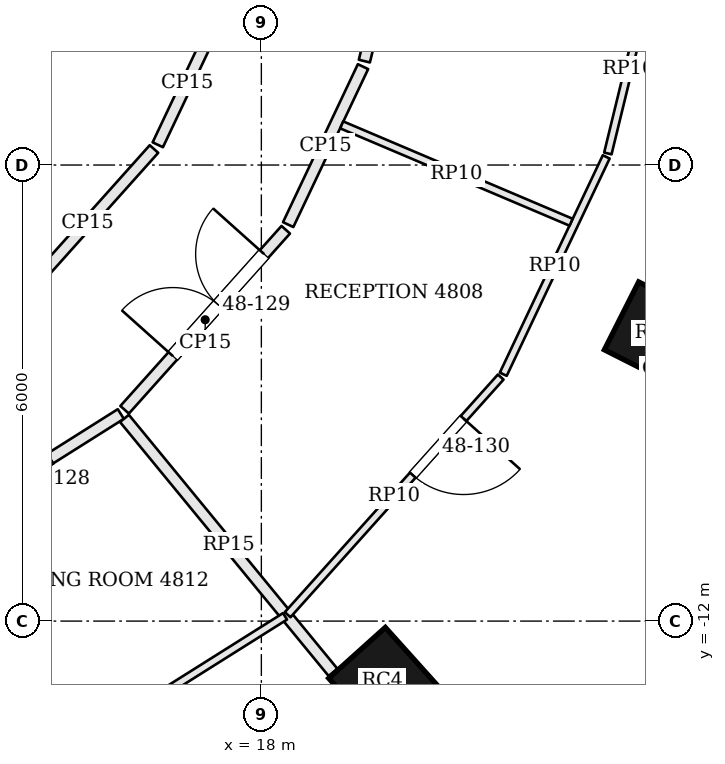
"""IFC4 building model, lengths in metres.
Left out: names, types, materials, properties, quantities, classifications, styles, units other than length and angle.
Written with IfcOpenShell. Run it as: python <this file> out.ifc"""

import sys

from ifc_helpers import new_model, si_unit, direction, frame, frame_2d, origin, origin_2d, place, context, subcontext, project, spatial, rectangle, extrude, element, fill, save


model = new_model("IFC4")
c1 = context("Model", 3, precision=1e-05, world=origin(), true_north=direction((0.0, 1.0)))
c2 = subcontext(c1, "Body", "Model", "MODEL_VIEW")
j1 = project(units=[si_unit("LENGTHUNIT", "METRE"), si_unit("PLANEANGLEUNIT", "RADIAN")], contexts=[c1])
p1 = place(None, origin())
s1 = spatial("IfcSite", under=j1, at=p1, CompositionType="ELEMENT")
p2 = place(p1, origin())
s2 = spatial("IfcBuilding", under=s1, at=p2, CompositionType="ELEMENT")
p3 = place(p2, frame((0.0, 0.0, 197.4)))
s3 = spatial("IfcBuildingStorey", under=s2, at=p3, CompositionType="ELEMENT", Elevation=197.4)
for number, where, z_axis, x_axis in (
    (1, (19.593, -12.79, 0.0), (0.0, 0.0, 1.0), (0.744, 0.668, 0.0)),
    (2, (23.185, -8.21, 0.0), (0.0, 0.0, 1.0), (0.451, 0.893, 0.0)),
):
    element("IfcColumn", number, at=place(p3, frame(where, z_axis=z_axis, x_axis=x_axis)), inside=s3, PredefinedType="COLUMN", context=c2, shape_type="SweptSolid", body=[
        extrude(rectangle(XDim=1.0, YDim=1.0, at=origin_2d()), origin(), (0.0, 0.0, 1.0), 3.9),
    ])
p4 = place(p3, frame((20.316, -14.507, 0.0), z_axis=(0.0, 0.0, 1.0), x_axis=(0.954807195185, 0.297225873743, 0.0)))
e3 = element("IfcWall", 3, at=p4, inside=s3, PredefinedType="SOLIDWALL", context=c2, shape_type="SweptSolid", body=[
    extrude(rectangle(XDim=5.526, YDim=0.45, at=frame_2d((2.763, 0.0))), origin(), (0.0, 0.0, 1.0), 3.7),
])
p5 = place(p4, frame((1.713, 0.0, 0.9)))
e4 = element("IfcOpeningElement", 4, at=p5, cuts=e3, PredefinedType="OPENING", context=c2, shape_type="SweptSolid", body=[
    extrude(rectangle(XDim=2.1, YDim=2.3, at=frame_2d((1.05, 1.15))), frame((0.0, 0.235, 0.0), z_axis=(0.0, -1.0, 0.0), x_axis=(1.0, 0.0, 0.0)), (0.0, 0.0, 1.0), 0.47),
])
p6 = place(p3, frame((13.197, -11.139, 0.0), z_axis=(0.0, 0.0, 1.0), x_axis=(0.845847451173, 0.533424867572, 0.0)))
e5 = element("IfcWall", 5, at=p6, inside=s3, PredefinedType="PARTITIONING", context=c2, shape_type="SweptSolid", body=[
    extrude(rectangle(XDim=3.493, YDim=0.15, at=frame_2d((1.747, 0.0))), origin(), (0.0, 0.0, 1.0), 3.084),
])
p7 = place(p6, frame((1.394, 0.0, 0.0)))
e6 = element("IfcOpeningElement", 6, at=p7, cuts=e5, PredefinedType="OPENING", context=c2, shape_type="SweptSolid", body=[
    extrude(rectangle(XDim=1.0, YDim=2.4, at=frame_2d((0.5, 1.2))), frame((0.0, 0.085, 0.0), z_axis=(0.0, -1.0, 0.0), x_axis=(1.0, 0.0, 0.0)), (0.0, 0.0, 1.0), 0.17),
])
p8 = place(p3, frame((18.943, -12.675, 0.0), z_axis=(0.0, 0.0, 1.0), x_axis=(-0.634730994321, 0.772733178301, 0.0)))
e7 = element("IfcWall", 7, at=p8, inside=s3, PredefinedType="PARTITIONING", context=c2, shape_type="SweptSolid", body=[
    extrude(rectangle(XDim=4.324, YDim=0.15, at=frame_2d((2.162, 0.0))), origin(), (0.0, 0.0, 1.0), 3.084),
])
p9 = place(p3, frame((16.201, -9.22, 0.0), z_axis=(0.0, 0.0, 1.0), x_axis=(0.666925083627, 0.745124776685, 0.0)))
e8 = element("IfcWall", 8, at=p9, inside=s3, PredefinedType="PARTITIONING", context=c2, shape_type="SweptSolid", body=[
    extrude(rectangle(XDim=3.178, YDim=0.15, at=frame_2d((1.589, 0.0))), origin(), (0.0, 0.0, 1.0), 3.084),
])
p10 = place(p9, frame((0.95, 0.0, 0.0)))
e9 = element("IfcOpeningElement", 9, at=p10, cuts=e8, PredefinedType="OPENING", context=c2, shape_type="SweptSolid", body=[
    extrude(rectangle(XDim=1.8, YDim=2.1, at=frame_2d((0.9, 1.05))), frame((0.0, 0.085, 0.0), z_axis=(0.0, -1.0, 0.0), x_axis=(1.0, 0.0, 0.0)), (0.0, 0.0, 1.0), 0.17),
])
p11 = place(p3, frame((18.353, -6.784, 0.0), z_axis=(0.0, 0.0, 1.0), x_axis=(0.428086344739, 0.903737838894, 0.0)))
e10 = element("IfcWall", 10, at=p11, inside=s3, PredefinedType="PARTITIONING", context=c2, shape_type="SweptSolid", body=[
    extrude(rectangle(XDim=2.3, YDim=0.15, at=frame_2d((1.15, 0.0))), origin(), (0.0, 0.0, 1.0), 3.084),
])
p12 = place(p3, frame((19.355, -4.633, 0.0), z_axis=(0.0, 0.0, 1.0), x_axis=(0.236703930685, 0.971581828359, 0.0)))
e11 = element("IfcWall", 11, at=p12, inside=s3, PredefinedType="PARTITIONING", context=c2, shape_type="SweptSolid", body=[
    extrude(rectangle(XDim=1.626, YDim=0.15, at=frame_2d((0.813, 0.0))), origin(), (0.0, 0.0, 1.0), 3.084),
])
p13 = place(p3, frame((17.41, -4.102, 0.0), z_axis=(0.0, 0.0, 1.0), x_axis=(-0.428074720318, -0.903743345107, 0.0)))
e12 = element("IfcWall", 12, at=p13, inside=s3, PredefinedType="PARTITIONING", context=c2, shape_type="SweptSolid", body=[
    extrude(rectangle(XDim=1.806, YDim=0.15, at=frame_2d((0.903, 0.0))), origin(), (0.0, 0.0, 1.0), 3.084),
])
p14 = place(p3, frame((16.587, -5.789, 0.0), z_axis=(0.0, 0.0, 1.0), x_axis=(-0.666887460656, -0.745158449472, 0.0)))
e13 = element("IfcWall", 13, at=p14, inside=s3, PredefinedType="PARTITIONING", context=c2, shape_type="SweptSolid", body=[
    extrude(rectangle(XDim=2.62, YDim=0.15, at=frame_2d((1.31, 0.0))), origin(), (0.0, 0.0, 1.0), 3.084),
])
p15 = place(p3, frame((18.312, -11.938, 0.0), z_axis=(0.0, 0.0, 1.0), x_axis=(-0.846383069278, -0.532574595752, 0.0)))
e14 = element("IfcWall", 14, at=p15, inside=s3, PredefinedType="PARTITIONING", context=c2, shape_type="SweptSolid", body=[
    extrude(rectangle(XDim=4.341, YDim=0.1, at=frame_2d((2.171, 0.0))), origin(), (0.0, 0.0, 1.0), 3.084),
])
p16 = place(p3, frame((23.101, -3.623, 0.0), z_axis=(0.0, 0.0, 1.0), x_axis=(-0.236811358433, -0.971555649727, 0.0)))
e15 = element("IfcWall", 15, at=p16, inside=s3, PredefinedType="PARTITIONING", context=c2, shape_type="SweptSolid", body=[
    extrude(rectangle(XDim=2.29, YDim=0.1, at=frame_2d((1.145, 0.0))), origin(), (0.0, 0.0, 1.0), 3.084),
])
p17 = place(p3, frame((22.537, -5.893, 0.0), z_axis=(0.0, 0.0, 1.0), x_axis=(-0.428099612517, -0.903731554037, 0.0)))
e16 = element("IfcWall", 16, at=p17, inside=s3, PredefinedType="PARTITIONING", context=c2, shape_type="SweptSolid", body=[
    extrude(rectangle(XDim=3.164, YDim=0.1, at=frame_2d((1.582, 0.0))), origin(), (0.0, 0.0, 1.0), 3.084),
])
p18 = place(p3, frame((21.149, -8.789, 0.0), z_axis=(0.0, 0.0, 1.0), x_axis=(-0.667605024822, -0.744515635049, 0.0)))
e17 = element("IfcWall", 17, at=p18, inside=s3, PredefinedType="PARTITIONING", context=c2, shape_type="SweptSolid", body=[
    extrude(rectangle(XDim=4.2, YDim=0.1, at=frame_2d((2.1, 0.0))), origin(), (0.0, 0.0, 1.0), 3.084),
])
p19 = place(p18, frame((0.733, 0.0, 0.0)))
e18 = element("IfcOpeningElement", 18, at=p19, cuts=e17, PredefinedType="OPENING", context=c2, shape_type="SweptSolid", body=[
    extrude(rectangle(XDim=1.0, YDim=2.1, at=frame_2d((0.5, 1.05))), frame((0.0, 0.06, 0.0), z_axis=(0.0, -1.0, 0.0), x_axis=(1.0, 0.0, 0.0)), (0.0, 0.0, 1.0), 0.12),
])
p20 = place(p3, frame((19.057, -5.472, 0.0), z_axis=(0.0, 0.0, 1.0), x_axis=(0.920545263458, -0.390635914792, 0.0)))
e19 = element("IfcWall", 19, at=p20, inside=s3, PredefinedType="PARTITIONING", context=c2, shape_type="SweptSolid", body=[
    extrude(rectangle(XDim=3.278, YDim=0.1, at=frame_2d((1.639, 0.0))), origin(), (0.0, 0.0, 1.0), 3.084),
])
p21 = place(p10, origin())
e20 = element("IfcDoor", 20, at=p21, inside=s3, OperationType="DOUBLE_DOOR_SINGLE_SWING", PredefinedType="DOOR", context=c2, shape_type="SweptSolid", body=[
    extrude(rectangle(XDim=1.8, YDim=2.1, at=frame_2d((0.9, 1.05))), frame((0.0, 0.025, 0.0), z_axis=(0.0, -1.0, 0.0), x_axis=(1.0, 0.0, 0.0)), (0.0, 0.0, 1.0), 0.05),
])
fill(e9, e20)
p22 = place(p19, origin())
e21 = element("IfcDoor", 21, at=p22, inside=s3, OperationType="SINGLE_SWING_LEFT", PredefinedType="DOOR", context=c2, shape_type="SweptSolid", body=[
    extrude(rectangle(XDim=1.0, YDim=2.1, at=frame_2d((0.5, 1.05))), frame((0.0, 0.025, 0.0), z_axis=(0.0, -1.0, 0.0), x_axis=(1.0, 0.0, 0.0)), (0.0, 0.0, 1.0), 0.05),
])
fill(e18, e21)
save(model, sys.argv[1])
